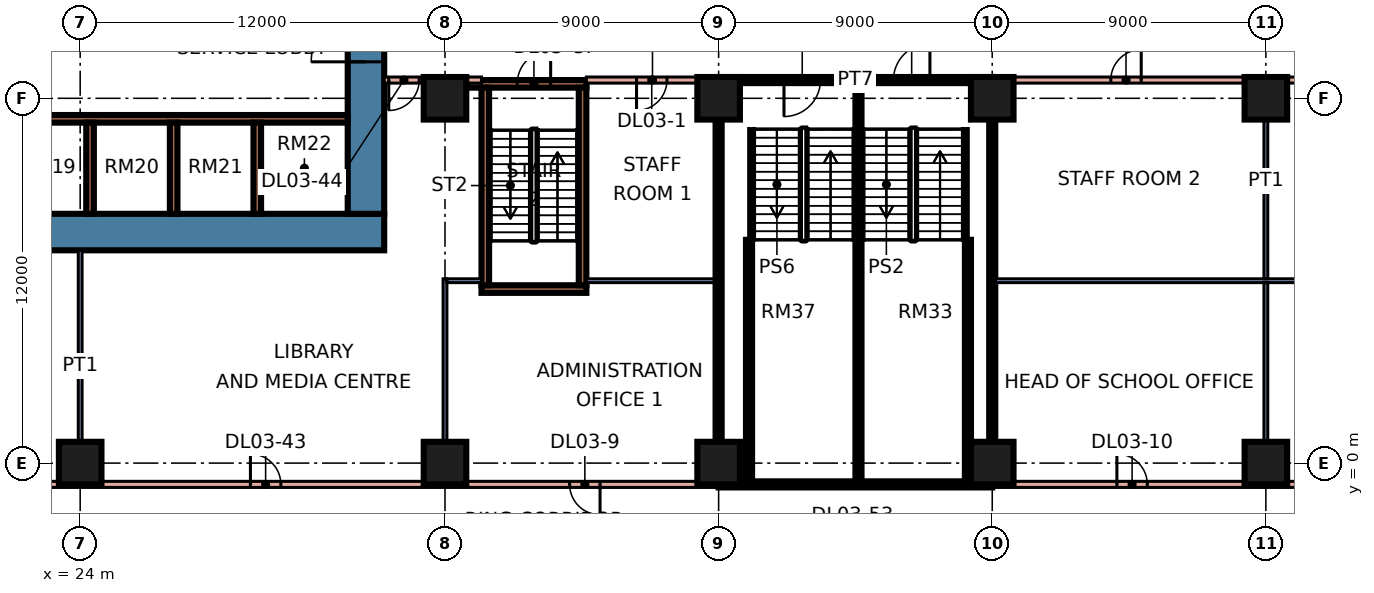
"""IFC4 building model, lengths in metres.
Left out: names, types, materials, properties, quantities, classifications, styles, units other than length and angle.
Written with IfcOpenShell. Run it as: python <this file> out.ifc"""

import sys

from ifc_helpers import new_model, si_unit, direction, frame, frame_2d, origin, origin_2d, place, context, subcontext, project, spatial, rectangle, extrude, element, fill, save


model = new_model("IFC4")
c1 = context("Model", 3, precision=1e-05, world=origin(), true_north=direction((0.0, 1.0)))
c2 = subcontext(c1, "Body", "Model", "MODEL_VIEW")
j1 = project(units=[si_unit("LENGTHUNIT", "METRE"), si_unit("PLANEANGLEUNIT", "RADIAN")], contexts=[c1])
p1 = place(None, origin())
s1 = spatial("IfcSite", under=j1, at=p1, CompositionType="ELEMENT")
p2 = place(p1, origin())
s2 = spatial("IfcBuilding", under=s1, at=p2, CompositionType="ELEMENT")
p3 = place(p2, frame((0.0, 0.0, 16.8)))
s3 = spatial("IfcBuildingStorey", under=s2, at=p3, CompositionType="ELEMENT", Elevation=16.8)
for number, where, z_axis, x_axis in (
    (1, (24.0, 0.0, 0.0), (0.0, 0.0, 1.0), (1.0, 0.0, 0.0)),
    (2, (36.0, 0.0, 0.0), (0.0, 0.0, 1.0), (1.0, 0.0, 0.0)),
    (3, (45.0, 0.0, 0.0), (0.0, 0.0, 1.0), (1.0, 0.0, 0.0)),
    (4, (54.0, 0.0, 0.0), (0.0, 0.0, 1.0), (1.0, 0.0, 0.0)),
    (5, (63.0, 0.0, 0.0), (0.0, 0.0, 1.0), (1.0, 0.0, 0.0)),
    (6, (36.0, 12.0, 0.0), (0.0, 0.0, 1.0), (1.0, 0.0, 0.0)),
    (7, (45.0, 12.0, 0.0), (0.0, 0.0, 1.0), (1.0, 0.0, 0.0)),
    (8, (54.0, 12.0, 0.0), (0.0, 0.0, 1.0), (1.0, 0.0, 0.0)),
    (9, (63.0, 12.0, 0.0), (0.0, 0.0, 1.0), (1.0, 0.0, 0.0)),
):
    element("IfcColumn", number, at=place(p3, frame(where, z_axis=z_axis, x_axis=x_axis)), inside=s3, PredefinedType="COLUMN", context=c2, shape_type="SweptSolid", body=[
        extrude(rectangle(XDim=1.4, YDim=1.4, at=origin_2d()), origin(), (0.0, 0.0, 1.0), 4.8),
    ])
p4 = place(p3, frame((9.0, 7.6, 0.0), z_axis=(0.0, 0.0, 1.0), x_axis=(1.0, 0.0, 0.0)))
e10 = element("IfcWall", 10, at=p4, inside=s3, PredefinedType="SHEAR", context=c2, shape_type="SweptSolid", body=[
    extrude(rectangle(XDim=25.0, YDim=1.2, at=frame_2d((12.5, 0.0))), origin(), (0.0, 0.0, 1.0), 4.8),
])
p5 = place(p3, frame((33.4, 8.2, 0.0), z_axis=(0.0, 0.0, 1.0), x_axis=(0.0, 1.0, 0.0)))
e11 = element("IfcWall", 11, at=p5, inside=s3, PredefinedType="SHEAR", context=c2, shape_type="SweptSolid", body=[
    extrude(rectangle(XDim=10.6, YDim=1.2, at=frame_2d((5.3, 0.0))), origin(), (0.0, 0.0, 1.0), 4.8),
])
p6 = place(p5, frame((5.0, 0.0, 0.0)))
e12 = element("IfcOpeningElement", 12, at=p6, cuts=e11, PredefinedType="OPENING", context=c2, shape_type="SweptSolid", body=[
    extrude(rectangle(XDim=1.8, YDim=2.4, at=frame_2d((0.9, 1.2))), frame((0.0, 0.61, 0.0), z_axis=(0.0, -1.0, 0.0), x_axis=(1.0, 0.0, 0.0)), (0.0, 0.0, 1.0), 1.22),
])
p7 = place(p3, frame((13.45, 11.325, 0.0), z_axis=(0.0, 0.0, 1.0), x_axis=(1.0, 0.0, 0.0)))
e13 = element("IfcWall", 13, at=p7, inside=s3, PredefinedType="SHEAR", context=c2, shape_type="SweptSolid", body=[
    extrude(rectangle(XDim=19.35, YDim=0.25, at=frame_2d((9.675, 0.0))), origin(), (0.0, 0.0, 1.0), 4.8),
])
for number, where, z_axis, x_axis in (
    (14, (24.325, 8.2, 0.0), (0.0, 0.0, 1.0), (0.0, 1.0, 0.0)),
    (15, (27.075, 8.2, 0.0), (0.0, 0.0, 1.0), (0.0, 1.0, 0.0)),
    (16, (29.825, 8.2, 0.0), (0.0, 0.0, 1.0), (0.0, 1.0, 0.0)),
):
    element("IfcWall", number, at=place(p3, frame(where, z_axis=z_axis, x_axis=x_axis)), inside=s3, PredefinedType="SHEAR", context=c2, shape_type="SweptSolid", body=[
        extrude(rectangle(XDim=3.0, YDim=0.25, at=frame_2d((1.5, 0.0))), origin(), (0.0, 0.0, 1.0), 4.8),
    ])
p8 = place(p3, frame((37.2, 5.725, 0.0), z_axis=(0.0, 0.0, 1.0), x_axis=(1.0, 0.0, 0.0)))
e17 = element("IfcWall", 17, at=p8, inside=s3, PredefinedType="SHEAR", context=c2, shape_type="SweptSolid", body=[
    extrude(rectangle(XDim=3.45, YDim=0.25, at=frame_2d((1.725, 0.0))), origin(), (0.0, 0.0, 1.0), 4.8),
])
p9 = place(p3, frame((36.7, 12.475, 0.0), z_axis=(0.0, 0.0, 1.0), x_axis=(1.0, 0.0, 0.0)))
e18 = element("IfcWall", 18, at=p9, inside=s3, PredefinedType="SHEAR", context=c2, shape_type="SweptSolid", body=[
    extrude(rectangle(XDim=3.95, YDim=0.25, at=frame_2d((1.975, 0.0))), origin(), (0.0, 0.0, 1.0), 4.8),
])
p10 = place(p9, frame((1.675, 0.0, 0.0)))
e19 = element("IfcOpeningElement", 19, at=p10, cuts=e18, PredefinedType="OPENING", context=c2, shape_type="SweptSolid", body=[
    extrude(rectangle(XDim=1.1, YDim=2.2, at=frame_2d((0.55, 1.1))), frame((0.0, 0.135, 0.0), z_axis=(0.0, -1.0, 0.0), x_axis=(1.0, 0.0, 0.0)), (0.0, 0.0, 1.0), 0.27),
])
for number, where, z_axis, x_axis in (
    (20, (37.325, 5.85, 0.0), (0.0, 0.0, 1.0), (0.0, 1.0, 0.0)),
    (21, (40.525, 5.85, 0.0), (0.0, 0.0, 1.0), (0.0, 1.0, 0.0)),
):
    element("IfcWall", number, at=place(p3, frame(where, z_axis=z_axis, x_axis=x_axis)), inside=s3, PredefinedType="SHEAR", context=c2, shape_type="SweptSolid", body=[
        extrude(rectangle(XDim=6.5, YDim=0.25, at=frame_2d((3.25, 0.0))), origin(), (0.0, 0.0, 1.0), 4.8),
    ])
p11 = place(p3, frame((1.304, -0.7, 0.0), z_axis=(0.0, 0.0, 1.0), x_axis=(1.0, 0.0, 0.0)))
e22 = element("IfcWall", 22, at=p11, inside=s3, PredefinedType="PARTITIONING", context=c2, shape_type="SweptSolid", body=[
    extrude(rectangle(XDim=43.696, YDim=0.2, at=frame_2d((21.848, 0.0))), origin(), (0.0, 0.0, 1.0), 4.4),
])
p12 = place(p11, frame((38.796, 0.0, 0.0)))
e23 = element("IfcOpeningElement", 23, at=p12, cuts=e22, PredefinedType="OPENING", context=c2, shape_type="SweptSolid", body=[
    extrude(rectangle(XDim=1.0, YDim=2.1, at=frame_2d((0.5, 1.05))), frame((0.0, 0.11, 0.0), z_axis=(0.0, -1.0, 0.0), x_axis=(1.0, 0.0, 0.0)), (0.0, 0.0, 1.0), 0.22),
])
p13 = place(p11, frame((4.796, 0.0, 0.0)))
e24 = element("IfcOpeningElement", 24, at=p13, cuts=e22, PredefinedType="OPENING", context=c2, shape_type="SweptSolid", body=[
    extrude(rectangle(XDim=1.0, YDim=2.1, at=frame_2d((0.5, 1.05))), frame((0.0, 0.11, 0.0), z_axis=(0.0, -1.0, 0.0), x_axis=(1.0, 0.0, 0.0)), (0.0, 0.0, 1.0), 0.22),
])
p14 = place(p11, frame((16.296, 0.0, 0.0)))
e25 = element("IfcOpeningElement", 25, at=p14, cuts=e22, PredefinedType="OPENING", context=c2, shape_type="SweptSolid", body=[
    extrude(rectangle(XDim=1.0, YDim=2.1, at=frame_2d((0.5, 1.05))), frame((0.0, 0.11, 0.0), z_axis=(0.0, -1.0, 0.0), x_axis=(1.0, 0.0, 0.0)), (0.0, 0.0, 1.0), 0.22),
])
p15 = place(p11, frame((28.296, 0.0, 0.0)))
e26 = element("IfcOpeningElement", 26, at=p15, cuts=e22, PredefinedType="OPENING", context=c2, shape_type="SweptSolid", body=[
    extrude(rectangle(XDim=1.0, YDim=2.1, at=frame_2d((0.5, 1.05))), frame((0.0, 0.11, 0.0), z_axis=(0.0, -1.0, 0.0), x_axis=(1.0, 0.0, 0.0)), (0.0, 0.0, 1.0), 0.22),
])
p16 = place(p3, frame((24.0, -0.6, 0.0), z_axis=(0.0, 0.0, 1.0), x_axis=(0.0, 1.0, 0.0)))
e27 = element("IfcWall", 27, at=p16, inside=s3, PredefinedType="PARTITIONING", context=c2, shape_type="SweptSolid", body=[
    extrude(rectangle(XDim=7.6, YDim=0.125, at=frame_2d((3.8, 0.0))), origin(), (0.0, 0.0, 1.0), 4.4),
])
p17 = place(p3, frame((34.0, 12.6, 0.0), z_axis=(0.0, 0.0, 1.0), x_axis=(1.0, 0.0, 0.0)))
e28 = element("IfcWall", 28, at=p17, inside=s3, PredefinedType="PARTITIONING", context=c2, shape_type="SweptSolid", body=[
    extrude(rectangle(XDim=3.2, YDim=0.2, at=frame_2d((1.6, 0.0))), origin(), (0.0, 0.0, 1.0), 4.4),
])
p18 = place(p17, frame((0.15, 0.0, 0.0)))
e29 = element("IfcOpeningElement", 29, at=p18, cuts=e28, PredefinedType="OPENING", context=c2, shape_type="SweptSolid", body=[
    extrude(rectangle(XDim=1.0, YDim=2.1, at=frame_2d((0.5, 1.05))), frame((0.0, 0.11, 0.0), z_axis=(0.0, -1.0, 0.0), x_axis=(1.0, 0.0, 0.0)), (0.0, 0.0, 1.0), 0.22),
])
p19 = place(p3, frame((36.0, -0.6, 0.0), z_axis=(0.0, 0.0, 1.0), x_axis=(0.0, 1.0, 0.0)))
e30 = element("IfcWall", 30, at=p19, inside=s3, PredefinedType="PARTITIONING", context=c2, shape_type="SweptSolid", body=[
    extrude(rectangle(XDim=6.662, YDim=0.125, at=frame_2d((3.331, 0.0))), origin(), (0.0, 0.0, 1.0), 4.4),
])
p20 = place(p3, frame((36.062, 6.0, 0.0), z_axis=(0.0, 0.0, 1.0), x_axis=(1.0, 0.0, 0.0)))
e31 = element("IfcWall", 31, at=p20, inside=s3, PredefinedType="PARTITIONING", context=c2, shape_type="SweptSolid", body=[
    extrude(rectangle(XDim=1.138, YDim=0.125, at=frame_2d((0.569, 0.0))), origin(), (0.0, 0.0, 1.0), 4.4),
])
p21 = place(p3, frame((40.65, 6.0, 0.0), z_axis=(0.0, 0.0, 1.0), x_axis=(1.0, 0.0, 0.0)))
e32 = element("IfcWall", 32, at=p21, inside=s3, PredefinedType="PARTITIONING", context=c2, shape_type="SweptSolid", body=[
    extrude(rectangle(XDim=4.25, YDim=0.125, at=frame_2d((2.125, 0.0))), origin(), (0.0, 0.0, 1.0), 4.4),
])
p22 = place(p3, frame((40.65, 12.6, 0.0), z_axis=(0.0, 0.0, 1.0), x_axis=(1.0, 0.0, 0.0)))
e33 = element("IfcWall", 33, at=p22, inside=s3, PredefinedType="PARTITIONING", context=c2, shape_type="SweptSolid", body=[
    extrude(rectangle(XDim=4.35, YDim=0.2, at=frame_2d((2.175, 0.0))), origin(), (0.0, 0.0, 1.0), 4.4),
])
p23 = place(p22, frame((1.65, 0.0, 0.0)))
e34 = element("IfcOpeningElement", 34, at=p23, cuts=e33, PredefinedType="OPENING", context=c2, shape_type="SweptSolid", body=[
    extrude(rectangle(XDim=1.0, YDim=2.1, at=frame_2d((0.5, 1.05))), frame((0.0, 0.11, 0.0), z_axis=(0.0, -1.0, 0.0), x_axis=(1.0, 0.0, 0.0)), (0.0, 0.0, 1.0), 0.22),
])
p24 = place(p3, frame((45.0, -0.7, 0.0), z_axis=(0.0, 0.0, 1.0), x_axis=(1.0, 0.0, 0.0)))
e35 = element("IfcWall", 35, at=p24, inside=s3, PredefinedType="SOLIDWALL", context=c2, shape_type="SweptSolid", body=[
    extrude(rectangle(XDim=9.0, YDim=0.2, at=frame_2d((4.5, 0.0))), origin(), (0.0, 0.0, 1.0), 4.4),
])
p25 = place(p3, frame((45.0, -0.6, 0.0), z_axis=(0.0, 0.0, 1.0), x_axis=(0.0, 1.0, 0.0)))
e36 = element("IfcWall", 36, at=p25, inside=s3, PredefinedType="SOLIDWALL", context=c2, shape_type="SweptSolid", body=[
    extrude(rectangle(XDim=13.1, YDim=0.2, at=frame_2d((6.55, 0.0))), origin(), (0.0, 0.0, 1.0), 4.4),
])
p26 = place(p3, frame((45.0, 12.6, 0.0), z_axis=(0.0, 0.0, 1.0), x_axis=(1.0, 0.0, 0.0)))
e37 = element("IfcWall", 37, at=p26, inside=s3, PredefinedType="SOLIDWALL", context=c2, shape_type="SweptSolid", body=[
    extrude(rectangle(XDim=9.0, YDim=0.2, at=frame_2d((4.5, 0.0))), origin(), (0.0, 0.0, 1.0), 4.4),
])
p27 = place(p26, frame((5.75, 0.0, 0.0)))
e38 = element("IfcOpeningElement", 38, at=p27, cuts=e37, PredefinedType="OPENING", context=c2, shape_type="SweptSolid", body=[
    extrude(rectangle(XDim=1.2, YDim=2.1, at=frame_2d((0.6, 1.05))), frame((0.0, 0.11, 0.0), z_axis=(0.0, -1.0, 0.0), x_axis=(1.0, 0.0, 0.0)), (0.0, 0.0, 1.0), 0.22),
])
p28 = place(p26, frame((2.15, 0.0, 0.0)))
e39 = element("IfcOpeningElement", 39, at=p28, cuts=e37, PredefinedType="OPENING", context=c2, shape_type="SweptSolid", body=[
    extrude(rectangle(XDim=1.2, YDim=2.1, at=frame_2d((0.6, 1.05))), frame((0.0, 0.11, 0.0), z_axis=(0.0, -1.0, 0.0), x_axis=(1.0, 0.0, 0.0)), (0.0, 0.0, 1.0), 0.22),
])
p29 = place(p3, frame((49.6, -0.6, 0.0), z_axis=(0.0, 0.0, 1.0), x_axis=(0.0, 1.0, 0.0)))
e40 = element("IfcWall", 40, at=p29, inside=s3, PredefinedType="SOLIDWALL", context=c2, shape_type="SweptSolid", body=[
    extrude(rectangle(XDim=13.1, YDim=0.2, at=frame_2d((6.55, 0.0))), origin(), (0.0, 0.0, 1.0), 4.4),
])
p30 = place(p3, frame((54.0, -0.7, 0.0), z_axis=(0.0, 0.0, 1.0), x_axis=(1.0, 0.0, 0.0)))
e41 = element("IfcWall", 41, at=p30, inside=s3, PredefinedType="PARTITIONING", context=c2, shape_type="SweptSolid", body=[
    extrude(rectangle(XDim=21.0, YDim=0.2, at=frame_2d((10.5, 0.0))), origin(), (0.0, 0.0, 1.0), 4.4),
])
p31 = place(p30, frame((4.1, 0.0, 0.0)))
e42 = element("IfcOpeningElement", 42, at=p31, cuts=e41, PredefinedType="OPENING", context=c2, shape_type="SweptSolid", body=[
    extrude(rectangle(XDim=1.0, YDim=2.1, at=frame_2d((0.5, 1.05))), frame((0.0, 0.11, 0.0), z_axis=(0.0, -1.0, 0.0), x_axis=(1.0, 0.0, 0.0)), (0.0, 0.0, 1.0), 0.22),
])
p32 = place(p30, frame((18.9, 0.0, 0.0)))
e43 = element("IfcOpeningElement", 43, at=p32, cuts=e41, PredefinedType="OPENING", context=c2, shape_type="SweptSolid", body=[
    extrude(rectangle(XDim=1.8, YDim=2.1, at=frame_2d((0.9, 1.05))), frame((0.0, 0.11, 0.0), z_axis=(0.0, -1.0, 0.0), x_axis=(1.0, 0.0, 0.0)), (0.0, 0.0, 1.0), 0.22),
])
p33 = place(p3, frame((54.0, -0.6, 0.0), z_axis=(0.0, 0.0, 1.0), x_axis=(0.0, 1.0, 0.0)))
e44 = element("IfcWall", 44, at=p33, inside=s3, PredefinedType="SOLIDWALL", context=c2, shape_type="SweptSolid", body=[
    extrude(rectangle(XDim=13.1, YDim=0.2, at=frame_2d((6.55, 0.0))), origin(), (0.0, 0.0, 1.0), 4.4),
])
p34 = place(p3, frame((54.0, 12.6, 0.0), z_axis=(0.0, 0.0, 1.0), x_axis=(1.0, 0.0, 0.0)))
e45 = element("IfcWall", 45, at=p34, inside=s3, PredefinedType="PARTITIONING", context=c2, shape_type="SweptSolid", body=[
    extrude(rectangle(XDim=18.8, YDim=0.2, at=frame_2d((9.4, 0.0))), origin(), (0.0, 0.0, 1.0), 4.4),
])
p35 = place(p34, frame((3.9, 0.0, 0.0)))
e46 = element("IfcOpeningElement", 46, at=p35, cuts=e45, PredefinedType="OPENING", context=c2, shape_type="SweptSolid", body=[
    extrude(rectangle(XDim=1.0, YDim=2.1, at=frame_2d((0.5, 1.05))), frame((0.0, 0.11, 0.0), z_axis=(0.0, -1.0, 0.0), x_axis=(1.0, 0.0, 0.0)), (0.0, 0.0, 1.0), 0.22),
])
p36 = place(p34, frame((12.9, 0.0, 0.0)))
e47 = element("IfcOpeningElement", 47, at=p36, cuts=e45, PredefinedType="OPENING", context=c2, shape_type="SweptSolid", body=[
    extrude(rectangle(XDim=1.0, YDim=2.1, at=frame_2d((0.5, 1.05))), frame((0.0, 0.11, 0.0), z_axis=(0.0, -1.0, 0.0), x_axis=(1.0, 0.0, 0.0)), (0.0, 0.0, 1.0), 0.22),
])
p37 = place(p3, frame((54.1, 6.0, 0.0), z_axis=(0.0, 0.0, 1.0), x_axis=(1.0, 0.0, 0.0)))
e48 = element("IfcWall", 48, at=p37, inside=s3, PredefinedType="PARTITIONING", context=c2, shape_type="SweptSolid", body=[
    extrude(rectangle(XDim=17.962, YDim=0.125, at=frame_2d((8.981, 0.0))), origin(), (0.0, 0.0, 1.0), 4.4),
])
p38 = place(p3, frame((63.0, -0.6, 0.0), z_axis=(0.0, 0.0, 1.0), x_axis=(0.0, 1.0, 0.0)))
e49 = element("IfcWall", 49, at=p38, inside=s3, PredefinedType="PARTITIONING", context=c2, shape_type="SweptSolid", body=[
    extrude(rectangle(XDim=6.538, YDim=0.125, at=frame_2d((3.269, 0.0))), origin(), (0.0, 0.0, 1.0), 4.4),
])
p39 = place(p3, frame((63.0, 6.062, 0.0), z_axis=(0.0, 0.0, 1.0), x_axis=(0.0, 1.0, 0.0)))
e50 = element("IfcWall", 50, at=p39, inside=s3, PredefinedType="PARTITIONING", context=c2, shape_type="SweptSolid", body=[
    extrude(rectangle(XDim=6.438, YDim=0.125, at=frame_2d((3.219, 0.0))), origin(), (0.0, 0.0, 1.0), 4.4),
])
for number, where, z_axis, x_axis in (
    (51, (53.2, -0.6, 0.0), (0.0, 0.0, 1.0), (0.0, 1.0, 0.0)),
    (52, (46.0, -0.6, 0.0), (0.0, 0.0, 1.0), (0.0, 1.0, 0.0)),
):
    element("IfcWall", number, at=place(p3, frame(where, z_axis=z_axis, x_axis=x_axis)), inside=s3, PredefinedType="SOLIDWALL", context=c2, shape_type="SweptSolid", body=[
        extrude(rectangle(XDim=7.945, YDim=0.2, at=frame_2d((3.973, 0.0))), origin(), (0.0, 0.0, 1.0), 4.4),
    ])
p40 = place(p6, origin())
e53 = element("IfcDoor", 53, at=p40, inside=s3, OperationType="DOUBLE_DOOR_SINGLE_SWING", PredefinedType="DOOR", context=c2, shape_type="SweptSolid", body=[
    extrude(rectangle(XDim=1.8, YDim=2.4, at=frame_2d((0.9, 1.2))), frame((0.0, 0.025, 0.0), z_axis=(0.0, -1.0, 0.0), x_axis=(1.0, 0.0, 0.0)), (0.0, 0.0, 1.0), 0.05),
])
fill(e12, e53)
p41 = place(p10, frame((1.1, 0.0, 0.0), z_axis=(0.0, 0.0, 1.0), x_axis=(-1.0, 0.0, 0.0)))
e54 = element("IfcDoor", 54, at=p41, inside=s3, OperationType="SINGLE_SWING_RIGHT", PredefinedType="DOOR", context=c2, shape_type="SweptSolid", body=[
    extrude(rectangle(XDim=1.1, YDim=2.2, at=frame_2d((0.55, 1.1))), frame((0.0, 0.025, 0.0), z_axis=(0.0, -1.0, 0.0), x_axis=(1.0, 0.0, 0.0)), (0.0, 0.0, 1.0), 0.05),
])
fill(e19, e54)
p42 = place(p23, frame((1.0, 0.0, 0.0), z_axis=(0.0, 0.0, 1.0), x_axis=(-1.0, 0.0, 0.0)))
e55 = element("IfcDoor", 55, at=p42, inside=s3, OperationType="SINGLE_SWING_LEFT", PredefinedType="DOOR", context=c2, shape_type="SweptSolid", body=[
    extrude(rectangle(XDim=1.0, YDim=2.1, at=frame_2d((0.5, 1.05))), frame((0.0, 0.025, 0.0), z_axis=(0.0, -1.0, 0.0), x_axis=(1.0, 0.0, 0.0)), (0.0, 0.0, 1.0), 0.05),
])
fill(e34, e55)
p43 = place(p35, frame((1.0, 0.0, 0.0), z_axis=(0.0, 0.0, 1.0), x_axis=(-1.0, 0.0, 0.0)))
e56 = element("IfcDoor", 56, at=p43, inside=s3, OperationType="SINGLE_SWING_RIGHT", PredefinedType="DOOR", context=c2, shape_type="SweptSolid", body=[
    extrude(rectangle(XDim=1.0, YDim=2.1, at=frame_2d((0.5, 1.05))), frame((0.0, 0.025, 0.0), z_axis=(0.0, -1.0, 0.0), x_axis=(1.0, 0.0, 0.0)), (0.0, 0.0, 1.0), 0.05),
])
fill(e46, e56)
p44 = place(p12, origin())
e57 = element("IfcDoor", 57, at=p44, inside=s3, OperationType="SINGLE_SWING_RIGHT", PredefinedType="DOOR", context=c2, shape_type="SweptSolid", body=[
    extrude(rectangle(XDim=1.0, YDim=2.1, at=frame_2d((0.5, 1.05))), frame((0.0, 0.025, 0.0), z_axis=(0.0, -1.0, 0.0), x_axis=(1.0, 0.0, 0.0)), (0.0, 0.0, 1.0), 0.05),
])
fill(e23, e57)
p45 = place(p31, origin())
e58 = element("IfcDoor", 58, at=p45, inside=s3, OperationType="SINGLE_SWING_LEFT", PredefinedType="DOOR", context=c2, shape_type="SweptSolid", body=[
    extrude(rectangle(XDim=1.0, YDim=2.1, at=frame_2d((0.5, 1.05))), frame((0.0, 0.025, 0.0), z_axis=(0.0, -1.0, 0.0), x_axis=(1.0, 0.0, 0.0)), (0.0, 0.0, 1.0), 0.05),
])
fill(e42, e58)
p46 = place(p15, origin())
e59 = element("IfcDoor", 59, at=p46, inside=s3, OperationType="SINGLE_SWING_LEFT", PredefinedType="DOOR", context=c2, shape_type="SweptSolid", body=[
    extrude(rectangle(XDim=1.0, YDim=2.1, at=frame_2d((0.5, 1.05))), frame((0.0, 0.025, 0.0), z_axis=(0.0, -1.0, 0.0), x_axis=(1.0, 0.0, 0.0)), (0.0, 0.0, 1.0), 0.05),
])
fill(e26, e59)
p47 = place(p18, frame((1.0, 0.0, 0.0), z_axis=(0.0, 0.0, 1.0), x_axis=(-1.0, 0.0, 0.0)))
e60 = element("IfcDoor", 60, at=p47, inside=s3, OperationType="SINGLE_SWING_LEFT", PredefinedType="DOOR", context=c2, shape_type="SweptSolid", body=[
    extrude(rectangle(XDim=1.0, YDim=2.1, at=frame_2d((0.5, 1.05))), frame((0.0, 0.025, 0.0), z_axis=(0.0, -1.0, 0.0), x_axis=(1.0, 0.0, 0.0)), (0.0, 0.0, 1.0), 0.05),
])
fill(e29, e60)
p48 = place(p27, frame((1.2, 0.0, 0.0), z_axis=(0.0, 0.0, 1.0), x_axis=(-1.0, 0.0, 0.0)))
e61 = element("IfcDoor", 61, at=p48, inside=s3, OperationType="SINGLE_SWING_RIGHT", PredefinedType="DOOR", context=c2, shape_type="SweptSolid", body=[
    extrude(rectangle(XDim=1.2, YDim=2.1, at=frame_2d((0.6, 1.05))), frame((0.0, 0.025, 0.0), z_axis=(0.0, -1.0, 0.0), x_axis=(1.0, 0.0, 0.0)), (0.0, 0.0, 1.0), 0.05),
])
fill(e38, e61)
p49 = place(p28, frame((1.2, 0.0, 0.0), z_axis=(0.0, 0.0, 1.0), x_axis=(-1.0, 0.0, 0.0)))
e62 = element("IfcDoor", 62, at=p49, inside=s3, OperationType="SINGLE_SWING_LEFT", PredefinedType="DOOR", context=c2, shape_type="SweptSolid", body=[
    extrude(rectangle(XDim=1.2, YDim=2.1, at=frame_2d((0.6, 1.05))), frame((0.0, 0.025, 0.0), z_axis=(0.0, -1.0, 0.0), x_axis=(1.0, 0.0, 0.0)), (0.0, 0.0, 1.0), 0.05),
])
fill(e39, e62)
save(model, sys.argv[1])
